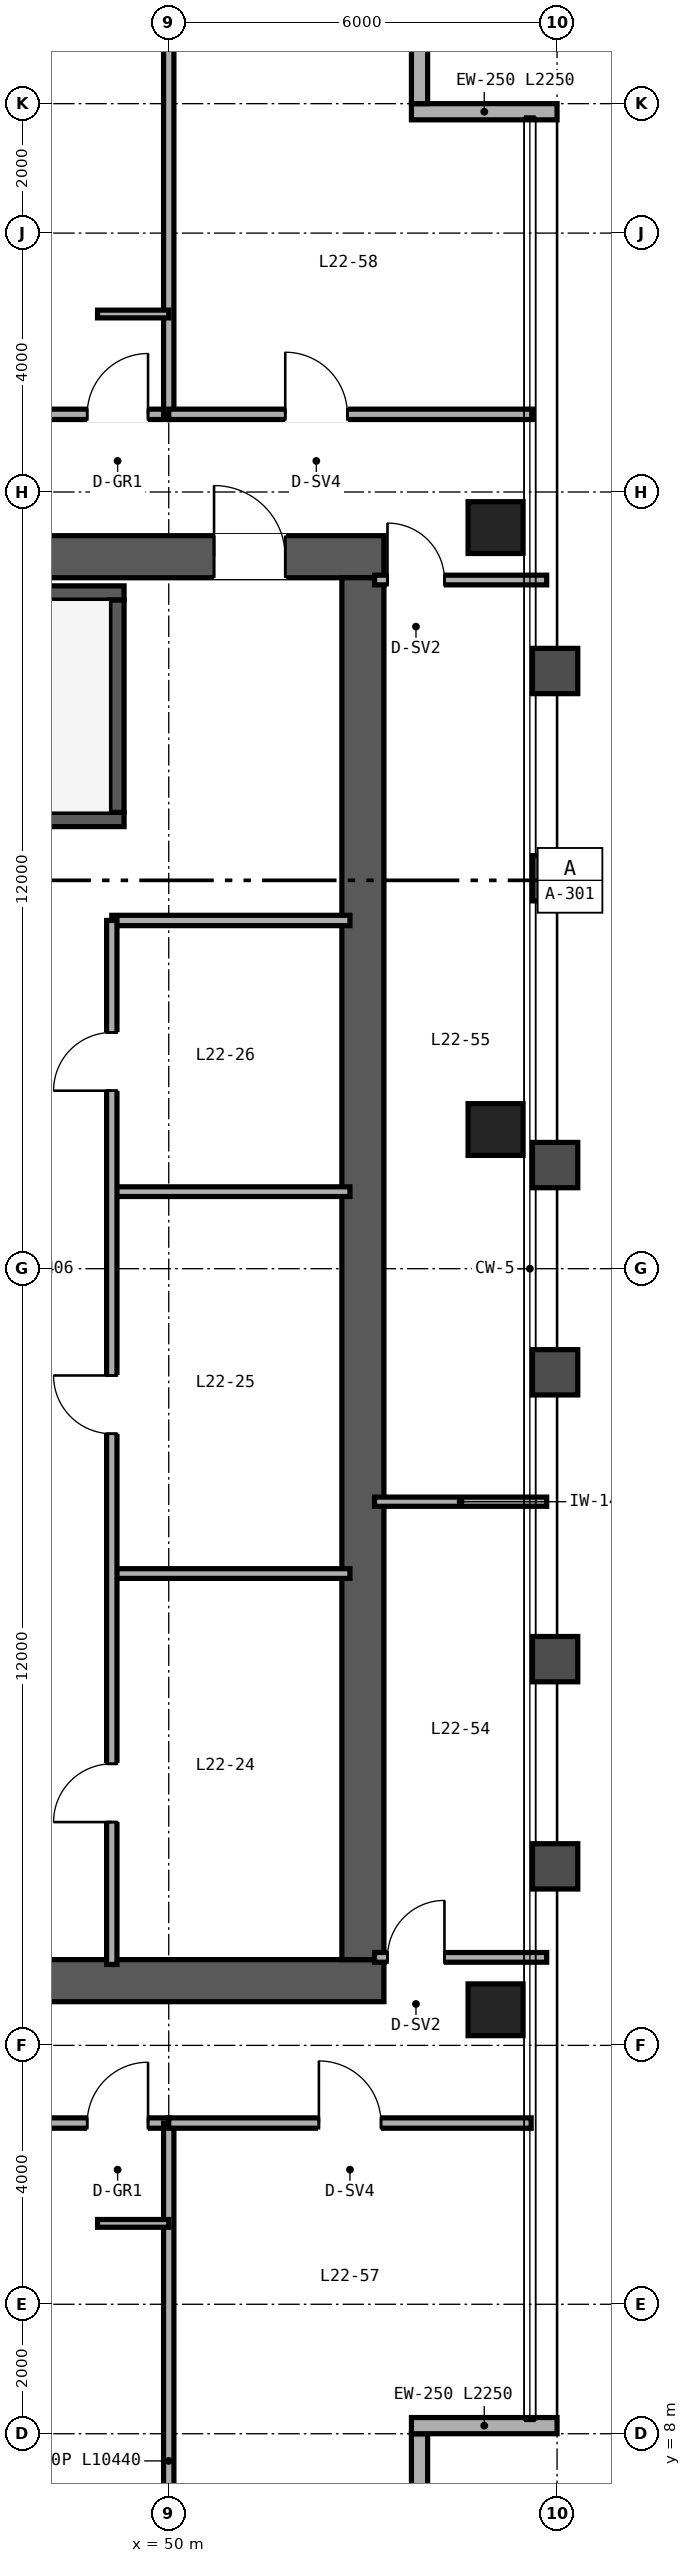
"""IFC4 building model, lengths in metres.
Left out: names, types, materials, properties, quantities, classifications, styles, units other than length and angle.
Written with IfcOpenShell. Run it as: python <this file> out.ifc"""

import sys

from ifc_helpers import new_model, si_unit, direction, frame, frame_2d, origin, origin_2d, place, context, subcontext, project, spatial, rectangle, hollow_rectangle, extrude, source, transform, mapped, element, fill, save


model = new_model("IFC4")
c1 = context("Model", 3, precision=1e-05, world=origin(), true_north=direction((0.0, 1.0)))
c2 = subcontext(c1, "Body", "Model", "MODEL_VIEW")
j1 = project(units=[si_unit("LENGTHUNIT", "METRE"), si_unit("PLANEANGLEUNIT", "RADIAN")], contexts=[c1])
p1 = place(None, origin())
s1 = spatial("IfcSite", under=j1, at=p1, CompositionType="ELEMENT")
p2 = place(p1, origin())
s2 = spatial("IfcBuilding", under=s1, at=p2, CompositionType="ELEMENT")
p3 = place(p2, frame((0.0, 0.0, 92.4)))
s3 = spatial("IfcBuildingStorey", under=s2, at=p3, CompositionType="ELEMENT", Elevation=92.4)
p4 = place(p3, frame((40.675, 15.0, 0.0), z_axis=(0.0, 0.0, 1.0), x_axis=(1.0, 0.0, 0.0)))
e1 = element("IfcWall", 1, at=p4, inside=s3, PredefinedType="SHEAR", context=c2, shape_type="SweptSolid", body=[
    extrude(rectangle(XDim=12.65, YDim=0.65, at=frame_2d((6.325, 0.0))), origin(), (0.0, 0.0, 1.0), 4.56),
])
p5 = place(p4, frame((4.425, 0.0, 0.0)))
e2 = element("IfcOpeningElement", 2, at=p5, cuts=e1, PredefinedType="OPENING", context=c2, shape_type="SweptSolid", body=[
    extrude(rectangle(XDim=1.0, YDim=2.15, at=frame_2d((0.5, 1.075))), frame((0.0, 0.335, 0.0), z_axis=(0.0, -1.0, 0.0), x_axis=(1.0, 0.0, 0.0)), (0.0, 0.0, 1.0), 0.67),
])
p6 = place(p3, frame((40.675, 37.0, 0.0), z_axis=(0.0, 0.0, 1.0), x_axis=(1.0, 0.0, 0.0)))
e3 = element("IfcWall", 3, at=p6, inside=s3, PredefinedType="SHEAR", context=c2, shape_type="SweptSolid", body=[
    extrude(rectangle(XDim=12.65, YDim=0.65, at=frame_2d((6.325, 0.0))), origin(), (0.0, 0.0, 1.0), 4.56),
])
p7 = place(p6, frame((10.025, 0.0, 0.0)))
e4 = element("IfcOpeningElement", 4, at=p7, cuts=e3, PredefinedType="OPENING", context=c2, shape_type="SweptSolid", body=[
    extrude(rectangle(XDim=1.1, YDim=2.15, at=frame_2d((0.55, 1.075))), frame((0.0, 0.335, 0.0), z_axis=(0.0, -1.0, 0.0), x_axis=(1.0, 0.0, 0.0)), (0.0, 0.0, 1.0), 0.67),
])
p8 = place(p3, frame((53.0, 15.325, 0.0), z_axis=(0.0, 0.0, 1.0), x_axis=(0.0, 1.0, 0.0)))
e5 = element("IfcWall", 5, at=p8, inside=s3, PredefinedType="SHEAR", context=c2, shape_type="SweptSolid", body=[
    extrude(rectangle(XDim=21.35, YDim=0.65, at=frame_2d((10.675, 0.0))), origin(), (0.0, 0.0, 1.0), 4.56),
])
p9 = place(p3, frame((41.325, 32.94, 0.0), z_axis=(0.0, 0.0, 1.0), x_axis=(1.0, 0.0, 0.0)))
e6 = element("IfcWall", 6, at=p9, inside=s3, PredefinedType="SHEAR", context=c2, shape_type="SweptSolid", body=[
    extrude(rectangle(XDim=7.985, YDim=0.22, at=frame_2d((3.993, 0.0))), origin(), (0.0, 0.0, 1.0), 4.6),
])
p10 = place(p9, frame((0.595, 0.0, 0.0)))
e7 = element("IfcOpeningElement", 7, at=p10, cuts=e6, PredefinedType="OPENING", context=c2, shape_type="SweptSolid", body=[
    extrude(rectangle(XDim=1.05, YDim=2.15, at=frame_2d((0.525, 1.075))), frame((0.0, 0.12, 0.0), z_axis=(0.0, -1.0, 0.0), x_axis=(1.0, 0.0, 0.0)), (0.0, 0.0, 1.0), 0.24),
])
p11 = place(p3, frame((41.325, 36.44, 0.0), z_axis=(0.0, 0.0, 1.0), x_axis=(1.0, 0.0, 0.0)))
e8 = element("IfcWall", 8, at=p11, inside=s3, PredefinedType="SHEAR", context=c2, shape_type="SweptSolid", body=[
    extrude(rectangle(XDim=7.985, YDim=0.22, at=frame_2d((3.993, 0.0))), origin(), (0.0, 0.0, 1.0), 4.6),
])
p12 = place(p3, frame((49.2, 33.05, 0.0), z_axis=(0.0, 0.0, 1.0), x_axis=(0.0, 1.0, 0.0)))
e9 = element("IfcWall", 9, at=p12, inside=s3, PredefinedType="SHEAR", context=c2, shape_type="SweptSolid", body=[
    extrude(rectangle(XDim=3.28, YDim=0.22, at=frame_2d((1.64, 0.0))), origin(), (0.0, 0.0, 1.0), 4.6),
])
m1 = source(origin(), c2, "Body", "SweptSolid", [
    extrude(hollow_rectangle(XDim=0.85, YDim=0.8, WallThickness=0.032, at=origin_2d()), origin(), (0.0, 0.0, 1.0), 4.56),
])
for number, where, z_axis, x_axis in (
    (10, (55.05, 14.55, 0.0), (0.0, 0.0, 1.0), (1.0, 0.0, 0.0)),
    (11, (55.05, 28.15, 0.0), (0.0, 0.0, 1.0), (1.0, 0.0, 0.0)),
    (12, (55.05, 37.45, 0.0), (0.0, 0.0, 1.0), (1.0, 0.0, 0.0)),
):
    element("IfcColumn", number, at=place(p3, frame(where, z_axis=z_axis, x_axis=x_axis)), inside=s3, PredefinedType="COLUMN", context=c2, shape_type="MappedRepresentation", body=[
        mapped(m1, transform((0.0, 0.0, 0.0), scale=1.0)),
    ])
p13 = place(p3, frame((53.875, 6.0, 0.0), z_axis=(0.0, 0.0, 1.0), x_axis=(0.0, 1.0, 0.0)))
e13 = element("IfcWall", 13, at=p13, inside=s3, PredefinedType="SOLIDWALL", context=c2, shape_type="SweptSolid", body=[
    extrude(rectangle(XDim=2.0, YDim=0.25, at=frame_2d((1.0, 0.0))), origin(), (0.0, 0.0, 1.0), 4.56),
])
for number, where, z_axis, x_axis in (
    (14, (53.75, 8.125, 0.0), (0.0, 0.0, 1.0), (1.0, 0.0, 0.0)),
    (15, (56.0, 43.875, 0.0), (0.0, 0.0, 1.0), (-1.0, 0.0, 0.0)),
):
    element("IfcWall", number, at=place(p3, frame(where, z_axis=z_axis, x_axis=x_axis)), inside=s3, PredefinedType="SOLIDWALL", context=c2, shape_type="SweptSolid", body=[
        extrude(rectangle(XDim=2.25, YDim=0.25, at=frame_2d((1.125, 0.0))), origin(), (0.0, 0.0, 1.0), 4.56),
    ])
p14 = place(p3, frame((53.875, 44.0, 0.0), z_axis=(0.0, 0.0, 1.0), x_axis=(0.0, 1.0, 0.0)))
e16 = element("IfcWall", 16, at=p14, inside=s3, PredefinedType="SOLIDWALL", context=c2, shape_type="SweptSolid", body=[
    extrude(rectangle(XDim=2.0, YDim=0.25, at=frame_2d((1.0, 0.0))), origin(), (0.0, 0.0, 1.0), 4.56),
])
p15 = place(p3, frame((49.12, 31.38, 0.0), z_axis=(0.0, 0.0, 1.0), x_axis=(1.0, 0.0, 0.0)))
e17 = element("IfcWall", 17, at=p15, inside=s3, PredefinedType="PARTITIONING", context=c2, shape_type="SweptSolid", body=[
    extrude(rectangle(XDim=3.68, YDim=0.16, at=frame_2d((1.84, 0.0))), origin(), (0.0, 0.0, 1.0), 3.46),
])
for number, where, z_axis, x_axis in (
    (18, (49.12, 21.29, 0.0), (0.0, 0.0, 1.0), (1.0, 0.0, 0.0)),
    (19, (49.12, 27.19, 0.0), (0.0, 0.0, 1.0), (1.0, 0.0, 0.0)),
):
    element("IfcWall", number, at=place(p3, frame(where, z_axis=z_axis, x_axis=x_axis)), inside=s3, PredefinedType="PARTITIONING", context=c2, shape_type="SweptSolid", body=[
        extrude(rectangle(XDim=3.68, YDim=0.15, at=frame_2d((1.84, 0.0))), origin(), (0.0, 0.0, 1.0), 4.56),
    ])
p16 = place(p3, frame((49.12, 15.25, 0.0), z_axis=(0.0, 0.0, 1.0), x_axis=(0.0, 1.0, 0.0)))
e20 = element("IfcWall", 20, at=p16, inside=s3, PredefinedType="PARTITIONING", context=c2, shape_type="SweptSolid", body=[
    extrude(rectangle(XDim=16.13, YDim=0.16, at=frame_2d((8.065, 0.0))), origin(), (0.0, 0.0, 1.0), 3.46),
])
p17 = place(p16, frame((2.2, 0.0, 0.0)))
e21 = element("IfcOpeningElement", 21, at=p17, cuts=e20, PredefinedType="OPENING", context=c2, shape_type="SweptSolid", body=[
    extrude(rectangle(XDim=0.9, YDim=2.15, at=frame_2d((0.45, 1.075))), frame((0.0, 0.09, 0.0), z_axis=(0.0, -1.0, 0.0), x_axis=(1.0, 0.0, 0.0)), (0.0, 0.0, 1.0), 0.18),
])
p18 = place(p16, frame((8.2, 0.0, 0.0)))
e22 = element("IfcOpeningElement", 22, at=p18, cuts=e20, PredefinedType="OPENING", context=c2, shape_type="SweptSolid", body=[
    extrude(rectangle(XDim=0.9, YDim=2.15, at=frame_2d((0.45, 1.075))), frame((0.0, 0.09, 0.0), z_axis=(0.0, -1.0, 0.0), x_axis=(1.0, 0.0, 0.0)), (0.0, 0.0, 1.0), 0.18),
])
p19 = place(p16, frame((13.5, 0.0, 0.0)))
e23 = element("IfcOpeningElement", 23, at=p19, cuts=e20, PredefinedType="OPENING", context=c2, shape_type="SweptSolid", body=[
    extrude(rectangle(XDim=0.9, YDim=2.15, at=frame_2d((0.45, 1.075))), frame((0.0, 0.09, 0.0), z_axis=(0.0, -1.0, 0.0), x_axis=(1.0, 0.0, 0.0)), (0.0, 0.0, 1.0), 0.18),
])
p20 = place(p3, frame((14.0, 12.8, 0.0), z_axis=(0.0, 0.0, 1.0), x_axis=(1.0, 0.0, 0.0)))
e24 = element("IfcWall", 24, at=p20, inside=s3, PredefinedType="PARTITIONING", context=c2, shape_type="SweptSolid", body=[
    extrude(rectangle(XDim=36.0, YDim=0.16, at=frame_2d((18.0, 0.0))), origin(), (0.0, 0.0, 1.0), 3.781),
])
p21 = place(p20, frame((4.02, 0.0, 0.0)))
e25 = element("IfcOpeningElement", 25, at=p21, cuts=e24, PredefinedType="OPENING", context=c2, shape_type="SweptSolid", body=[
    extrude(rectangle(XDim=0.96, YDim=2.15, at=frame_2d((0.48, 1.075))), frame((0.0, 0.09, 0.0), z_axis=(0.0, -1.0, 0.0), x_axis=(1.0, 0.0, 0.0)), (0.0, 0.0, 1.0), 0.18),
])
p22 = place(p20, frame((13.02, 0.0, 0.0)))
e26 = element("IfcOpeningElement", 26, at=p22, cuts=e24, PredefinedType="OPENING", context=c2, shape_type="SweptSolid", body=[
    extrude(rectangle(XDim=0.96, YDim=2.15, at=frame_2d((0.48, 1.075))), frame((0.0, 0.09, 0.0), z_axis=(0.0, -1.0, 0.0), x_axis=(1.0, 0.0, 0.0)), (0.0, 0.0, 1.0), 0.18),
])
p23 = place(p20, frame((26.7, 0.0, 0.0)))
e27 = element("IfcOpeningElement", 27, at=p23, cuts=e24, PredefinedType="OPENING", context=c2, shape_type="SweptSolid", body=[
    extrude(rectangle(XDim=0.98, YDim=2.2, at=frame_2d((0.49, 1.1))), frame((0.0, 0.09, 0.0), z_axis=(0.0, -1.0, 0.0), x_axis=(1.0, 0.0, 0.0)), (0.0, 0.0, 1.0), 0.18),
])
p24 = place(p20, frame((34.74, 0.0, 0.0)))
e28 = element("IfcOpeningElement", 28, at=p24, cuts=e24, PredefinedType="OPENING", context=c2, shape_type="SweptSolid", body=[
    extrude(rectangle(XDim=0.94, YDim=2.15, at=frame_2d((0.47, 1.075))), frame((0.0, 0.09, 0.0), z_axis=(0.0, -1.0, 0.0), x_axis=(1.0, 0.0, 0.0)), (0.0, 0.0, 1.0), 0.18),
])
p25 = place(p3, frame((50.0, 2.36, 0.0), z_axis=(0.0, 0.0, 1.0), x_axis=(0.0, 1.0, 0.0)))
e29 = element("IfcWall", 29, at=p25, inside=s3, PredefinedType="PARTITIONING", context=c2, shape_type="SweptSolid", body=[
    extrude(rectangle(XDim=10.44, YDim=0.16, at=frame_2d((5.22, 0.0))), origin(), (0.0, 0.0, 1.0), 3.867),
])
p26 = place(p3, frame((48.9, 11.25, 0.0), z_axis=(0.0, 0.0, 1.0), x_axis=(1.0, 0.0, 0.0)))
e30 = element("IfcWall", 30, at=p26, inside=s3, PredefinedType="PARTITIONING", context=c2, shape_type="SweptSolid", body=[
    extrude(rectangle(XDim=1.1, YDim=0.12, at=frame_2d((0.55, 0.0))), origin(), (0.0, 0.0, 1.0), 4.56),
])
p27 = place(p3, frame((14.0, 39.2, 0.0), z_axis=(0.0, 0.0, 1.0), x_axis=(1.0, 0.0, 0.0)))
e31 = element("IfcWall", 31, at=p27, inside=s3, PredefinedType="PARTITIONING", context=c2, shape_type="SweptSolid", body=[
    extrude(rectangle(XDim=36.0, YDim=0.16, at=frame_2d((18.0, 0.0))), origin(), (0.0, 0.0, 1.0), 3.781),
])
p28 = place(p27, frame((4.74, 0.0, 0.0)))
e32 = element("IfcOpeningElement", 32, at=p28, cuts=e31, PredefinedType="OPENING", context=c2, shape_type="SweptSolid", body=[
    extrude(rectangle(XDim=0.94, YDim=2.15, at=frame_2d((0.47, 1.075))), frame((0.0, 0.09, 0.0), z_axis=(0.0, -1.0, 0.0), x_axis=(1.0, 0.0, 0.0)), (0.0, 0.0, 1.0), 0.18),
])
p29 = place(p27, frame((10.74, 0.0, 0.0)))
e33 = element("IfcOpeningElement", 33, at=p29, cuts=e31, PredefinedType="OPENING", context=c2, shape_type="SweptSolid", body=[
    extrude(rectangle(XDim=0.94, YDim=2.15, at=frame_2d((0.47, 1.075))), frame((0.0, 0.09, 0.0), z_axis=(0.0, -1.0, 0.0), x_axis=(1.0, 0.0, 0.0)), (0.0, 0.0, 1.0), 0.18),
])
p30 = place(p27, frame((14.77, 0.0, 0.0)))
e34 = element("IfcOpeningElement", 34, at=p30, cuts=e31, PredefinedType="OPENING", context=c2, shape_type="SweptSolid", body=[
    extrude(rectangle(XDim=0.96, YDim=2.15, at=frame_2d((0.48, 1.075))), frame((0.0, 0.09, 0.0), z_axis=(0.0, -1.0, 0.0), x_axis=(1.0, 0.0, 0.0)), (0.0, 0.0, 1.0), 0.18),
])
p31 = place(p27, frame((23.74, 0.0, 0.0)))
e35 = element("IfcOpeningElement", 35, at=p31, cuts=e31, PredefinedType="OPENING", context=c2, shape_type="SweptSolid", body=[
    extrude(rectangle(XDim=0.94, YDim=2.15, at=frame_2d((0.47, 1.075))), frame((0.0, 0.09, 0.0), z_axis=(0.0, -1.0, 0.0), x_axis=(1.0, 0.0, 0.0)), (0.0, 0.0, 1.0), 0.18),
])
p32 = place(p27, frame((29.24, 0.0, 0.0)))
e36 = element("IfcOpeningElement", 36, at=p32, cuts=e31, PredefinedType="OPENING", context=c2, shape_type="SweptSolid", body=[
    extrude(rectangle(XDim=0.94, YDim=2.15, at=frame_2d((0.47, 1.075))), frame((0.0, 0.09, 0.0), z_axis=(0.0, -1.0, 0.0), x_axis=(1.0, 0.0, 0.0)), (0.0, 0.0, 1.0), 0.18),
])
p33 = place(p27, frame((34.74, 0.0, 0.0)))
e37 = element("IfcOpeningElement", 37, at=p33, cuts=e31, PredefinedType="OPENING", context=c2, shape_type="SweptSolid", body=[
    extrude(rectangle(XDim=0.94, YDim=2.15, at=frame_2d((0.47, 1.075))), frame((0.0, 0.09, 0.0), z_axis=(0.0, -1.0, 0.0), x_axis=(1.0, 0.0, 0.0)), (0.0, 0.0, 1.0), 0.18),
])
p34 = place(p3, frame((50.0, 39.2, 0.0), z_axis=(0.0, 0.0, 1.0), x_axis=(0.0, 1.0, 0.0)))
e38 = element("IfcWall", 38, at=p34, inside=s3, PredefinedType="PARTITIONING", context=c2, shape_type="SweptSolid", body=[
    extrude(rectangle(XDim=10.44, YDim=0.16, at=frame_2d((5.22, 0.0))), origin(), (0.0, 0.0, 1.0), 3.867),
])
p35 = place(p3, frame((48.9, 40.75, 0.0), z_axis=(0.0, 0.0, 1.0), x_axis=(1.0, 0.0, 0.0)))
e39 = element("IfcWall", 39, at=p35, inside=s3, PredefinedType="PARTITIONING", context=c2, shape_type="SweptSolid", body=[
    extrude(rectangle(XDim=1.1, YDim=0.12, at=frame_2d((0.55, 0.0))), origin(), (0.0, 0.0, 1.0), 4.56),
])
p36 = place(p3, frame((53.18, 15.36, 0.0), z_axis=(0.0, 0.0, 1.0), x_axis=(1.0, 0.0, 0.0)))
e40 = element("IfcWall", 40, at=p36, inside=s3, PredefinedType="PARTITIONING", context=c2, shape_type="SweptSolid", body=[
    extrude(rectangle(XDim=2.66, YDim=0.15, at=frame_2d((1.33, 0.0))), origin(), (0.0, 0.0, 1.0), 3.781),
])
p37 = place(p36, frame((0.2, 0.0, 0.0)))
e41 = element("IfcOpeningElement", 41, at=p37, cuts=e40, PredefinedType="OPENING", context=c2, shape_type="SweptSolid", body=[
    extrude(rectangle(XDim=0.88, YDim=2.15, at=frame_2d((0.44, 1.075))), frame((0.0, 0.085, 0.0), z_axis=(0.0, -1.0, 0.0), x_axis=(1.0, 0.0, 0.0)), (0.0, 0.0, 1.0), 0.17),
])
p38 = place(p3, frame((53.18, 36.64, 0.0), z_axis=(0.0, 0.0, 1.0), x_axis=(1.0, 0.0, 0.0)))
e42 = element("IfcWall", 42, at=p38, inside=s3, PredefinedType="PARTITIONING", context=c2, shape_type="SweptSolid", body=[
    extrude(rectangle(XDim=2.66, YDim=0.15, at=frame_2d((1.33, 0.0))), origin(), (0.0, 0.0, 1.0), 3.943),
])
p39 = place(p38, frame((0.2, 0.0, 0.0)))
e43 = element("IfcOpeningElement", 43, at=p39, cuts=e42, PredefinedType="OPENING", context=c2, shape_type="SweptSolid", body=[
    extrude(rectangle(XDim=0.88, YDim=2.15, at=frame_2d((0.44, 1.075))), frame((0.0, 0.085, 0.0), z_axis=(0.0, -1.0, 0.0), x_axis=(1.0, 0.0, 0.0)), (0.0, 0.0, 1.0), 0.17),
])
p40 = place(p3, frame((53.18, 22.4, 0.0), z_axis=(0.0, 0.0, 1.0), x_axis=(1.0, 0.0, 0.0)))
e44 = element("IfcWall", 44, at=p40, inside=s3, PredefinedType="PARTITIONING", context=c2, shape_type="SweptSolid", body=[
    extrude(rectangle(XDim=2.66, YDim=0.142, at=frame_2d((1.33, 0.0))), origin(), (0.0, 0.0, 1.0), 3.781),
])
p41 = place(p3, frame((50.0, 12.8, 0.0), z_axis=(0.0, 0.0, 1.0), x_axis=(1.0, 0.0, 0.0)))
e45 = element("IfcWall", 45, at=p41, inside=s3, PredefinedType="PARTITIONING", context=c2, shape_type="SweptSolid", body=[
    extrude(rectangle(XDim=5.6, YDim=0.16, at=frame_2d((2.8, 0.0))), origin(), (0.0, 0.0, 1.0), 4.56),
])
p42 = place(p41, frame((2.32, 0.0, 0.0)))
e46 = element("IfcOpeningElement", 46, at=p42, cuts=e45, PredefinedType="OPENING", context=c2, shape_type="SweptSolid", body=[
    extrude(rectangle(XDim=0.96, YDim=2.15, at=frame_2d((0.48, 1.075))), frame((0.0, 0.09, 0.0), z_axis=(0.0, -1.0, 0.0), x_axis=(1.0, 0.0, 0.0)), (0.0, 0.0, 1.0), 0.18),
])
p43 = place(p3, frame((50.0, 39.2, 0.0), z_axis=(0.0, 0.0, 1.0), x_axis=(1.0, 0.0, 0.0)))
e47 = element("IfcWall", 47, at=p43, inside=s3, PredefinedType="PARTITIONING", context=c2, shape_type="SweptSolid", body=[
    extrude(rectangle(XDim=5.62, YDim=0.16, at=frame_2d((2.81, 0.0))), origin(), (0.0, 0.0, 1.0), 4.56),
])
p44 = place(p43, frame((1.8, 0.0, 0.0)))
e48 = element("IfcOpeningElement", 48, at=p44, cuts=e47, PredefinedType="OPENING", context=c2, shape_type="SweptSolid", body=[
    extrude(rectangle(XDim=0.96, YDim=2.15, at=frame_2d((0.48, 1.075))), frame((0.0, 0.09, 0.0), z_axis=(0.0, -1.0, 0.0), x_axis=(1.0, 0.0, 0.0)), (0.0, 0.0, 1.0), 0.18),
])
m2 = source(origin(), c2, "Body", "SweptSolid", [
    extrude(rectangle(XDim=1.1, YDim=2.15, at=frame_2d((0.55, 1.075))), frame((0.0, 0.025, 0.0), z_axis=(0.0, -1.0, 0.0), x_axis=(1.0, 0.0, 0.0)), (0.0, 0.0, 1.0), 0.05),
])
p45 = place(p7, origin())
e49 = element("IfcDoor", 49, at=p45, inside=s3, OperationType="SINGLE_SWING_LEFT", PredefinedType="DOOR", context=c2, shape_type="MappedRepresentation", body=[
    mapped(m2, transform((0.0, 0.0, 0.0), scale=1.0)),
])
fill(e4, e49)
m3 = source(origin(), c2, "Body", "SweptSolid", [
    extrude(rectangle(XDim=0.9, YDim=2.15, at=frame_2d((0.45, 1.075))), frame((0.0, 0.025, 0.0), z_axis=(0.0, -1.0, 0.0), x_axis=(1.0, 0.0, 0.0)), (0.0, 0.0, 1.0), 0.05),
])
p46 = place(p17, origin())
e50 = element("IfcDoor", 50, at=p46, inside=s3, OperationType="SINGLE_SWING_LEFT", PredefinedType="DOOR", context=c2, shape_type="MappedRepresentation", body=[
    mapped(m3, transform((0.0, 0.0, 0.0), scale=1.0)),
])
fill(e21, e50)
p47 = place(p18, origin())
e51 = element("IfcDoor", 51, at=p47, inside=s3, OperationType="SINGLE_SWING_RIGHT", PredefinedType="DOOR", context=c2, shape_type="MappedRepresentation", body=[
    mapped(m3, transform((0.0, 0.0, 0.0), scale=1.0)),
])
fill(e22, e51)
p48 = place(p19, origin())
e52 = element("IfcDoor", 52, at=p48, inside=s3, OperationType="SINGLE_SWING_LEFT", PredefinedType="DOOR", context=c2, shape_type="MappedRepresentation", body=[
    mapped(m3, transform((0.0, 0.0, 0.0), scale=1.0)),
])
fill(e23, e52)
m4 = source(origin(), c2, "Body", "SweptSolid", [
    extrude(rectangle(XDim=0.94, YDim=2.15, at=frame_2d((0.47, 1.075))), frame((0.0, 0.025, 0.0), z_axis=(0.0, -1.0, 0.0), x_axis=(1.0, 0.0, 0.0)), (0.0, 0.0, 1.0), 0.05),
])
p49 = place(p24, origin())
e53 = element("IfcDoor", 53, at=p49, inside=s3, OperationType="SINGLE_SWING_RIGHT", PredefinedType="DOOR", context=c2, shape_type="MappedRepresentation", body=[
    mapped(m4, transform((0.0, 0.0, 0.0), scale=1.0)),
])
fill(e28, e53)
p50 = place(p33, origin())
e54 = element("IfcDoor", 54, at=p50, inside=s3, OperationType="SINGLE_SWING_RIGHT", PredefinedType="DOOR", context=c2, shape_type="MappedRepresentation", body=[
    mapped(m4, transform((0.0, 0.0, 0.0), scale=1.0)),
])
fill(e37, e54)
m5 = source(origin(), c2, "Body", "SweptSolid", [
    extrude(rectangle(XDim=0.88, YDim=2.15, at=frame_2d((0.44, 1.075))), frame((0.0, 0.025, 0.0), z_axis=(0.0, -1.0, 0.0), x_axis=(1.0, 0.0, 0.0)), (0.0, 0.0, 1.0), 0.05),
])
p51 = place(p37, origin())
e55 = element("IfcDoor", 55, at=p51, inside=s3, OperationType="SINGLE_SWING_RIGHT", PredefinedType="DOOR", context=c2, shape_type="MappedRepresentation", body=[
    mapped(m5, transform((0.0, 0.0, 0.0), scale=1.0)),
])
fill(e41, e55)
p52 = place(p39, origin())
e56 = element("IfcDoor", 56, at=p52, inside=s3, OperationType="SINGLE_SWING_LEFT", PredefinedType="DOOR", context=c2, shape_type="MappedRepresentation", body=[
    mapped(m5, transform((0.0, 0.0, 0.0), scale=1.0)),
])
fill(e43, e56)
m6 = source(origin(), c2, "Body", "SweptSolid", [
    extrude(rectangle(XDim=0.96, YDim=2.15, at=frame_2d((0.48, 1.075))), frame((0.0, 0.025, 0.0), z_axis=(0.0, -1.0, 0.0), x_axis=(1.0, 0.0, 0.0)), (0.0, 0.0, 1.0), 0.05),
])
p53 = place(p42, origin())
e57 = element("IfcDoor", 57, at=p53, inside=s3, OperationType="SINGLE_SWING_LEFT", PredefinedType="DOOR", context=c2, shape_type="MappedRepresentation", body=[
    mapped(m6, transform((0.0, 0.0, 0.0), scale=1.0)),
])
fill(e46, e57)
p54 = place(p44, origin())
e58 = element("IfcDoor", 58, at=p54, inside=s3, OperationType="SINGLE_SWING_LEFT", PredefinedType="DOOR", context=c2, shape_type="MappedRepresentation", body=[
    mapped(m6, transform((0.0, 0.0, 0.0), scale=1.0)),
])
fill(e48, e58)
save(model, sys.argv[1])
